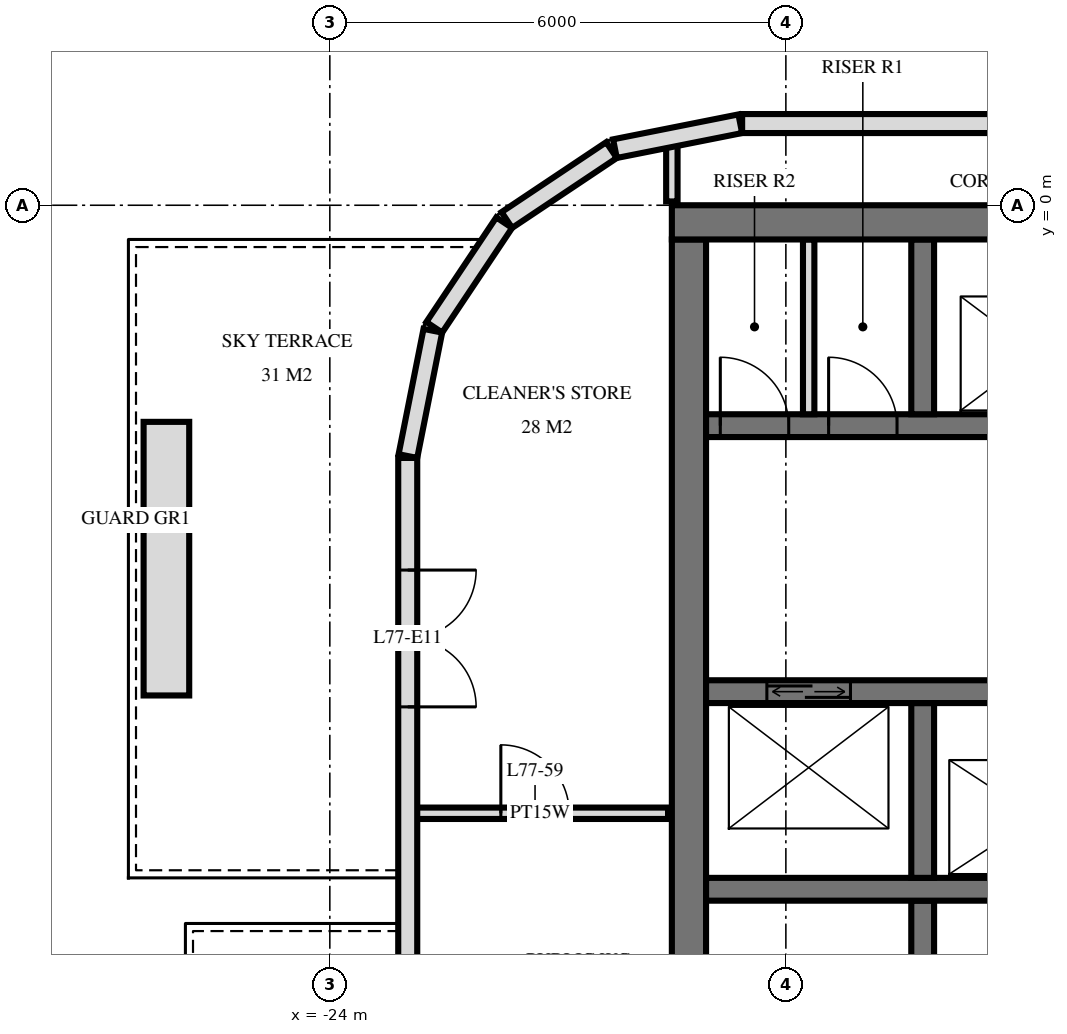
"""IFC4 building model, lengths in metres.
Left out: names, types, materials, properties, quantities, classifications, styles, units other than length and angle.
Written with IfcOpenShell. Run it as: python <this file> out.ifc"""

import sys

from ifc_helpers import new_model, si_unit, direction, frame, frame_2d, origin, place, context, subcontext, project, spatial, rectangle, extrude, element, fill, save


model = new_model("IFC4")
c1 = context("Model", 3, precision=1e-05, world=origin(), true_north=direction((0.0, 1.0)))
c2 = subcontext(c1, "Body", "Model", "MODEL_VIEW")
j1 = project(units=[si_unit("LENGTHUNIT", "METRE"), si_unit("PLANEANGLEUNIT", "RADIAN")], contexts=[c1])
p1 = place(None, origin())
s1 = spatial("IfcSite", under=j1, at=p1, CompositionType="ELEMENT")
p2 = place(p1, origin())
s2 = spatial("IfcBuilding", under=s1, at=p2, CompositionType="ELEMENT")
p3 = place(p2, frame((0.0, 0.0, 291.1)))
s3 = spatial("IfcBuildingStorey", under=s2, at=p3, CompositionType="ELEMENT", Elevation=291.1)
p4 = place(p3, frame((-19.5, -0.225, 0.0), z_axis=(0.0, 0.0, 1.0), x_axis=(1.0, 0.0, 0.0)))
e1 = element("IfcWall", 1, at=p4, inside=s3, PredefinedType="SHEAR", context=c2, shape_type="SweptSolid", body=[
    extrude(rectangle(XDim=9.5, YDim=0.45, at=frame_2d((4.75, 0.0))), origin(), (0.0, 0.0, 1.0), 3.5),
])
p5 = place(p3, frame((-19.275, -14.55, 0.0), z_axis=(0.0, 0.0, 1.0), x_axis=(0.0, 1.0, 0.0)))
e2 = element("IfcWall", 2, at=p5, inside=s3, PredefinedType="SHEAR", context=c2, shape_type="SweptSolid", body=[
    extrude(rectangle(XDim=14.1, YDim=0.45, at=frame_2d((7.05, 0.0))), origin(), (0.0, 0.0, 1.0), 3.5),
])
p6 = place(p3, frame((-19.05, -2.9, 0.0), z_axis=(0.0, 0.0, 1.0), x_axis=(1.0, 0.0, 0.0)))
e3 = element("IfcWall", 3, at=p6, inside=s3, PredefinedType="SHEAR", context=c2, shape_type="SweptSolid", body=[
    extrude(rectangle(XDim=8.7, YDim=0.3, at=frame_2d((4.35, 0.0))), origin(), (0.0, 0.0, 1.0), 3.5),
])
p7 = place(p6, frame((6.8, 0.0, 0.0)))
e4 = element("IfcOpeningElement", 4, at=p7, cuts=e3, PredefinedType="OPENING", context=c2, shape_type="SweptSolid", body=[
    extrude(rectangle(XDim=1.1, YDim=2.1, at=frame_2d((0.55, 1.05))), frame((0.0, 0.16, 0.0), z_axis=(0.0, -1.0, 0.0), x_axis=(1.0, 0.0, 0.0)), (0.0, 0.0, 1.0), 0.32),
])
p8 = place(p6, frame((3.8, 0.0, 0.0)))
e5 = element("IfcOpeningElement", 5, at=p8, cuts=e3, PredefinedType="OPENING", context=c2, shape_type="SweptSolid", body=[
    extrude(rectangle(XDim=1.1, YDim=2.1, at=frame_2d((0.55, 1.05))), frame((0.0, 0.16, 0.0), z_axis=(0.0, -1.0, 0.0), x_axis=(1.0, 0.0, 0.0)), (0.0, 0.0, 1.0), 0.32),
])
p9 = place(p6, frame((1.613, 0.0, 0.0)))
e6 = element("IfcOpeningElement", 6, at=p9, cuts=e3, PredefinedType="OPENING", context=c2, shape_type="SweptSolid", body=[
    extrude(rectangle(XDim=0.9, YDim=2.1, at=frame_2d((0.45, 1.05))), frame((0.0, 0.16, 0.0), z_axis=(0.0, -1.0, 0.0), x_axis=(1.0, 0.0, 0.0)), (0.0, 0.0, 1.0), 0.32),
])
p10 = place(p6, frame((0.188, 0.0, 0.0)))
e7 = element("IfcOpeningElement", 7, at=p10, cuts=e3, PredefinedType="OPENING", context=c2, shape_type="SweptSolid", body=[
    extrude(rectangle(XDim=0.9, YDim=2.1, at=frame_2d((0.45, 1.05))), frame((0.0, 0.16, 0.0), z_axis=(0.0, -1.0, 0.0), x_axis=(1.0, 0.0, 0.0)), (0.0, 0.0, 1.0), 0.32),
])
p11 = place(p3, frame((-19.05, -6.4, 0.0), z_axis=(0.0, 0.0, 1.0), x_axis=(1.0, 0.0, 0.0)))
e8 = element("IfcWall", 8, at=p11, inside=s3, PredefinedType="SHEAR", context=c2, shape_type="SweptSolid", body=[
    extrude(rectangle(XDim=8.7, YDim=0.3, at=frame_2d((4.35, 0.0))), origin(), (0.0, 0.0, 1.0), 3.5),
])
p12 = place(p11, frame((0.8, 0.0, 0.0)))
e9 = element("IfcOpeningElement", 9, at=p12, cuts=e8, PredefinedType="OPENING", context=c2, shape_type="SweptSolid", body=[
    extrude(rectangle(XDim=1.1, YDim=2.1, at=frame_2d((0.55, 1.05))), frame((0.0, 0.16, 0.0), z_axis=(0.0, -1.0, 0.0), x_axis=(1.0, 0.0, 0.0)), (0.0, 0.0, 1.0), 0.32),
])
p13 = place(p3, frame((-19.05, -9.0, 0.0), z_axis=(0.0, 0.0, 1.0), x_axis=(1.0, 0.0, 0.0)))
e10 = element("IfcWall", 10, at=p13, inside=s3, PredefinedType="SHEAR", context=c2, shape_type="SweptSolid", body=[
    extrude(rectangle(XDim=8.7, YDim=0.3, at=frame_2d((4.35, 0.0))), origin(), (0.0, 0.0, 1.0), 3.5),
])
p14 = place(p13, frame((3.8, 0.0, 0.0)))
e11 = element("IfcOpeningElement", 11, at=p14, cuts=e10, PredefinedType="OPENING", context=c2, shape_type="SweptSolid", body=[
    extrude(rectangle(XDim=1.1, YDim=2.1, at=frame_2d((0.55, 1.05))), frame((0.0, 0.16, 0.0), z_axis=(0.0, -1.0, 0.0), x_axis=(1.0, 0.0, 0.0)), (0.0, 0.0, 1.0), 0.32),
])
for number, where, z_axis, x_axis in (
    (12, (-16.2, -2.75, 0.0), (0.0, 0.0, 1.0), (0.0, 1.0, 0.0)),
    (13, (-16.2, -8.85, 0.0), (0.0, 0.0, 1.0), (0.0, 1.0, 0.0)),
):
    element("IfcWall", number, at=place(p3, frame(where, z_axis=z_axis, x_axis=x_axis)), inside=s3, PredefinedType="SHEAR", context=c2, shape_type="SweptSolid", body=[
        extrude(rectangle(XDim=2.3, YDim=0.3, at=frame_2d((1.15, 0.0))), origin(), (0.0, 0.0, 1.0), 3.5),
    ])
p15 = place(p3, frame((-16.2, -14.55, 0.0), z_axis=(0.0, 0.0, 1.0), x_axis=(0.0, 1.0, 0.0)))
e14 = element("IfcWall", 14, at=p15, inside=s3, PredefinedType="SHEAR", context=c2, shape_type="SweptSolid", body=[
    extrude(rectangle(XDim=5.4, YDim=0.3, at=frame_2d((2.7, 0.0))), origin(), (0.0, 0.0, 1.0), 3.5),
])
p16 = place(p15, frame((0.2, 0.0, 0.0)))
e15 = element("IfcOpeningElement", 15, at=p16, cuts=e14, PredefinedType="OPENING", context=c2, shape_type="SweptSolid", body=[
    extrude(rectangle(XDim=1.2, YDim=2.1, at=frame_2d((0.6, 1.05))), frame((0.0, 0.16, 0.0), z_axis=(0.0, -1.0, 0.0), x_axis=(1.0, 0.0, 0.0)), (0.0, 0.0, 1.0), 0.32),
])
p17 = place(p3, frame((18.575, 1.075, 0.0), z_axis=(0.0, 0.0, 1.0), x_axis=(-1.0, 0.0, 0.0)))
e16 = element("IfcWall", 16, at=p17, inside=s3, PredefinedType="SOLIDWALL", context=c2, shape_type="SweptSolid", body=[
    extrude(rectangle(XDim=37.151, YDim=0.25, at=frame_2d((18.575, 0.0))), origin(), (0.0, 0.0, 1.0), 3.22),
])
p18 = place(p17, frame((9.275, 0.0, 0.9)))
e17 = element("IfcOpeningElement", 17, at=p18, cuts=e16, PredefinedType="OPENING", context=c2, shape_type="SweptSolid", body=[
    extrude(rectangle(XDim=2.4, YDim=1.5, at=frame_2d((1.2, 0.75))), frame((0.0, 0.135, 0.0), z_axis=(0.0, -1.0, 0.0), x_axis=(1.0, 0.0, 0.0)), (0.0, 0.0, 1.0), 0.27),
])
p19 = place(p17, frame((12.275, 0.0, 0.9)))
e18 = element("IfcOpeningElement", 18, at=p19, cuts=e16, PredefinedType="OPENING", context=c2, shape_type="SweptSolid", body=[
    extrude(rectangle(XDim=2.4, YDim=1.5, at=frame_2d((1.2, 0.75))), frame((0.0, 0.135, 0.0), z_axis=(0.0, -1.0, 0.0), x_axis=(1.0, 0.0, 0.0)), (0.0, 0.0, 1.0), 0.27),
])
p20 = place(p17, frame((18.275, 0.0, 0.9)))
e19 = element("IfcOpeningElement", 19, at=p20, cuts=e16, PredefinedType="OPENING", context=c2, shape_type="SweptSolid", body=[
    extrude(rectangle(XDim=2.4, YDim=1.5, at=frame_2d((1.2, 0.75))), frame((0.0, 0.135, 0.0), z_axis=(0.0, -1.0, 0.0), x_axis=(1.0, 0.0, 0.0)), (0.0, 0.0, 1.0), 0.27),
])
p21 = place(p3, frame((-18.6, 1.073, 0.0), z_axis=(0.0, 0.0, 1.0), x_axis=(-0.980797896849, -0.195026884138, 0.0)))
e20 = element("IfcWall", 20, at=p21, inside=s3, PredefinedType="SOLIDWALL", context=c2, shape_type="SweptSolid", body=[
    extrude(rectangle(XDim=1.681, YDim=0.25, at=frame_2d((0.841, 0.0))), origin(), (0.0, 0.0, 1.0), 3.22),
])
for number, where, z_axis, x_axis in (
    (21, (-20.294, 0.726, 0.0), (0.0, 0.0, 1.0), (-0.831, -0.556, 0.0)),
    (22, (-21.706, -0.229, 0.0), (0.0, 0.0, 1.0), (-0.556, -0.831, 0.0)),
):
    element("IfcWall", number, at=place(p3, frame(where, z_axis=z_axis, x_axis=x_axis)), inside=s3, PredefinedType="SOLIDWALL", context=c2, shape_type="SweptSolid", body=[
        extrude(rectangle(XDim=1.656, YDim=0.25, at=frame_2d((0.828, 0.0))), origin(), (0.0, 0.0, 1.0), 3.22),
    ])
p22 = place(p3, frame((-22.645, -1.651, 0.0), z_axis=(0.0, 0.0, 1.0), x_axis=(-0.19513878023, -0.980775640221, 0.0)))
e23 = element("IfcWall", 23, at=p22, inside=s3, PredefinedType="SOLIDWALL", context=c2, shape_type="SweptSolid", body=[
    extrude(rectangle(XDim=1.681, YDim=0.25, at=frame_2d((0.841, 0.0))), origin(), (0.0, 0.0, 1.0), 3.22),
])
p23 = place(p3, frame((-22.975, -3.325, 0.0), z_axis=(0.0, 0.0, 1.0), x_axis=(0.0, -1.0, 0.0)))
e24 = element("IfcWall", 24, at=p23, inside=s3, PredefinedType="SOLIDWALL", context=c2, shape_type="SweptSolid", body=[
    extrude(rectangle(XDim=25.951, YDim=0.25, at=frame_2d((12.975, 0.0))), origin(), (0.0, 0.0, 1.0), 3.22),
])
p24 = place(p23, frame((1.475, 0.0, 0.0)))
e25 = element("IfcOpeningElement", 25, at=p24, cuts=e24, PredefinedType="OPENING", context=c2, shape_type="SweptSolid", body=[
    extrude(rectangle(XDim=1.8, YDim=2.4, at=frame_2d((0.9, 1.2))), frame((0.0, 0.135, 0.0), z_axis=(0.0, -1.0, 0.0), x_axis=(1.0, 0.0, 0.0)), (0.0, 0.0, 1.0), 0.27),
])
p25 = place(p23, frame((7.975, 0.0, 0.0)))
e26 = element("IfcOpeningElement", 26, at=p25, cuts=e24, PredefinedType="OPENING", context=c2, shape_type="SweptSolid", body=[
    extrude(rectangle(XDim=1.8, YDim=2.4, at=frame_2d((0.9, 1.2))), frame((0.0, 0.135, 0.0), z_axis=(0.0, -1.0, 0.0), x_axis=(1.0, 0.0, 0.0)), (0.0, 0.0, 1.0), 0.27),
])
p26 = place(p23, frame((18.175, 0.0, 0.0)))
e27 = element("IfcOpeningElement", 27, at=p26, cuts=e24, PredefinedType="OPENING", context=c2, shape_type="SweptSolid", body=[
    extrude(rectangle(XDim=1.8, YDim=2.4, at=frame_2d((0.9, 1.2))), frame((0.0, 0.135, 0.0), z_axis=(0.0, -1.0, 0.0), x_axis=(1.0, 0.0, 0.0)), (0.0, 0.0, 1.0), 0.27),
])
p27 = place(p23, frame((21.075, 0.0, 0.0)))
e28 = element("IfcOpeningElement", 28, at=p27, cuts=e24, PredefinedType="OPENING", context=c2, shape_type="SweptSolid", body=[
    extrude(rectangle(XDim=1.8, YDim=2.4, at=frame_2d((0.9, 1.2))), frame((0.0, 0.135, 0.0), z_axis=(0.0, -1.0, 0.0), x_axis=(1.0, 0.0, 0.0)), (0.0, 0.0, 1.0), 0.27),
])
p28 = place(p23, frame((23.825, 0.0, 0.9)))
e29 = element("IfcOpeningElement", 29, at=p28, cuts=e24, PredefinedType="OPENING", context=c2, shape_type="SweptSolid", body=[
    extrude(rectangle(XDim=1.8, YDim=1.5, at=frame_2d((0.9, 0.75))), frame((0.0, 0.135, 0.0), z_axis=(0.0, -1.0, 0.0), x_axis=(1.0, 0.0, 0.0)), (0.0, 0.0, 1.0), 0.27),
])
p29 = place(p3, frame((-26.15, -6.45, 0.0), z_axis=(0.0, 0.0, 1.0), x_axis=(0.0, 1.0, 0.0)))
e30 = element("IfcWall", 30, at=p29, inside=s3, PredefinedType="USERDEFINED", context=c2, shape_type="SweptSolid", body=[
    extrude(rectangle(XDim=3.6, YDim=0.6, at=frame_2d((1.8, 0.0))), origin(), (0.0, 0.0, 1.0), 0.65),
])
p30 = place(p3, frame((-17.7, -2.75, 0.0), z_axis=(0.0, 0.0, 1.0), x_axis=(0.0, 1.0, 0.0)))
e31 = element("IfcWall", 31, at=p30, inside=s3, PredefinedType="PARTITIONING", context=c2, shape_type="SweptSolid", body=[
    extrude(rectangle(XDim=2.3, YDim=0.15, at=frame_2d((1.15, 0.0))), origin(), (0.0, 0.0, 1.0), 3.2),
])
p31 = place(p3, frame((-19.5, 0.05, 0.0), z_axis=(0.0, 0.0, 1.0), x_axis=(0.0, 1.0, 0.0)))
e32 = element("IfcWall", 32, at=p31, inside=s3, PredefinedType="PARTITIONING", context=c2, shape_type="SweptSolid", body=[
    extrude(rectangle(XDim=0.787, YDim=0.15, at=frame_2d((0.394, 0.0))), origin(), (0.0, 0.0, 1.0), 3.22),
])
p32 = place(p3, frame((-22.92, -8.0, 0.0), z_axis=(0.0, 0.0, 1.0), x_axis=(1.0, 0.0, 0.0)))
e33 = element("IfcWall", 33, at=p32, inside=s3, PredefinedType="PLUMBINGWALL", context=c2, shape_type="SweptSolid", body=[
    extrude(rectangle(XDim=3.37, YDim=0.15, at=frame_2d((1.685, 0.0))), origin(), (0.0, 0.0, 1.0), 3.22),
])
p33 = place(p32, frame((1.17, 0.0, 0.0)))
e34 = element("IfcOpeningElement", 34, at=p33, cuts=e33, PredefinedType="OPENING", context=c2, shape_type="SweptSolid", body=[
    extrude(rectangle(XDim=0.9, YDim=2.1, at=frame_2d((0.45, 1.05))), frame((0.0, 0.085, 0.0), z_axis=(0.0, -1.0, 0.0), x_axis=(1.0, 0.0, 0.0)), (0.0, 0.0, 1.0), 0.17),
])
p34 = place(p24, origin())
e35 = element("IfcDoor", 35, at=p34, inside=s3, OperationType="DOUBLE_DOOR_SINGLE_SWING", PredefinedType="DOOR", context=c2, shape_type="SweptSolid", body=[
    extrude(rectangle(XDim=1.8, YDim=2.4, at=frame_2d((0.9, 1.2))), frame((0.0, 0.025, 0.0), z_axis=(0.0, -1.0, 0.0), x_axis=(1.0, 0.0, 0.0)), (0.0, 0.0, 1.0), 0.05),
])
fill(e25, e35)
p35 = place(p12, origin())
e36 = element("IfcDoor", 36, at=p35, inside=s3, OperationType="DOUBLE_DOOR_SLIDING", PredefinedType="USERDEFINED", context=c2, shape_type="SweptSolid", body=[
    extrude(rectangle(XDim=1.1, YDim=2.1, at=frame_2d((0.55, 1.05))), frame((0.0, 0.025, 0.0), z_axis=(0.0, -1.0, 0.0), x_axis=(1.0, 0.0, 0.0)), (0.0, 0.0, 1.0), 0.05),
])
fill(e9, e36)
p36 = place(p9, origin())
e37 = element("IfcDoor", 37, at=p36, inside=s3, OperationType="SINGLE_SWING_RIGHT", PredefinedType="DOOR", context=c2, shape_type="SweptSolid", body=[
    extrude(rectangle(XDim=0.9, YDim=2.1, at=frame_2d((0.45, 1.05))), frame((0.0, 0.025, 0.0), z_axis=(0.0, -1.0, 0.0), x_axis=(1.0, 0.0, 0.0)), (0.0, 0.0, 1.0), 0.05),
])
fill(e6, e37)
p37 = place(p10, origin())
e38 = element("IfcDoor", 38, at=p37, inside=s3, OperationType="SINGLE_SWING_RIGHT", PredefinedType="DOOR", context=c2, shape_type="SweptSolid", body=[
    extrude(rectangle(XDim=0.9, YDim=2.1, at=frame_2d((0.45, 1.05))), frame((0.0, 0.025, 0.0), z_axis=(0.0, -1.0, 0.0), x_axis=(1.0, 0.0, 0.0)), (0.0, 0.0, 1.0), 0.05),
])
fill(e7, e38)
p38 = place(p33, origin())
e39 = element("IfcDoor", 39, at=p38, inside=s3, OperationType="SINGLE_SWING_RIGHT", PredefinedType="DOOR", context=c2, shape_type="SweptSolid", body=[
    extrude(rectangle(XDim=0.9, YDim=2.1, at=frame_2d((0.45, 1.05))), frame((0.0, 0.025, 0.0), z_axis=(0.0, -1.0, 0.0), x_axis=(1.0, 0.0, 0.0)), (0.0, 0.0, 1.0), 0.05),
])
fill(e34, e39)
save(model, sys.argv[1])
